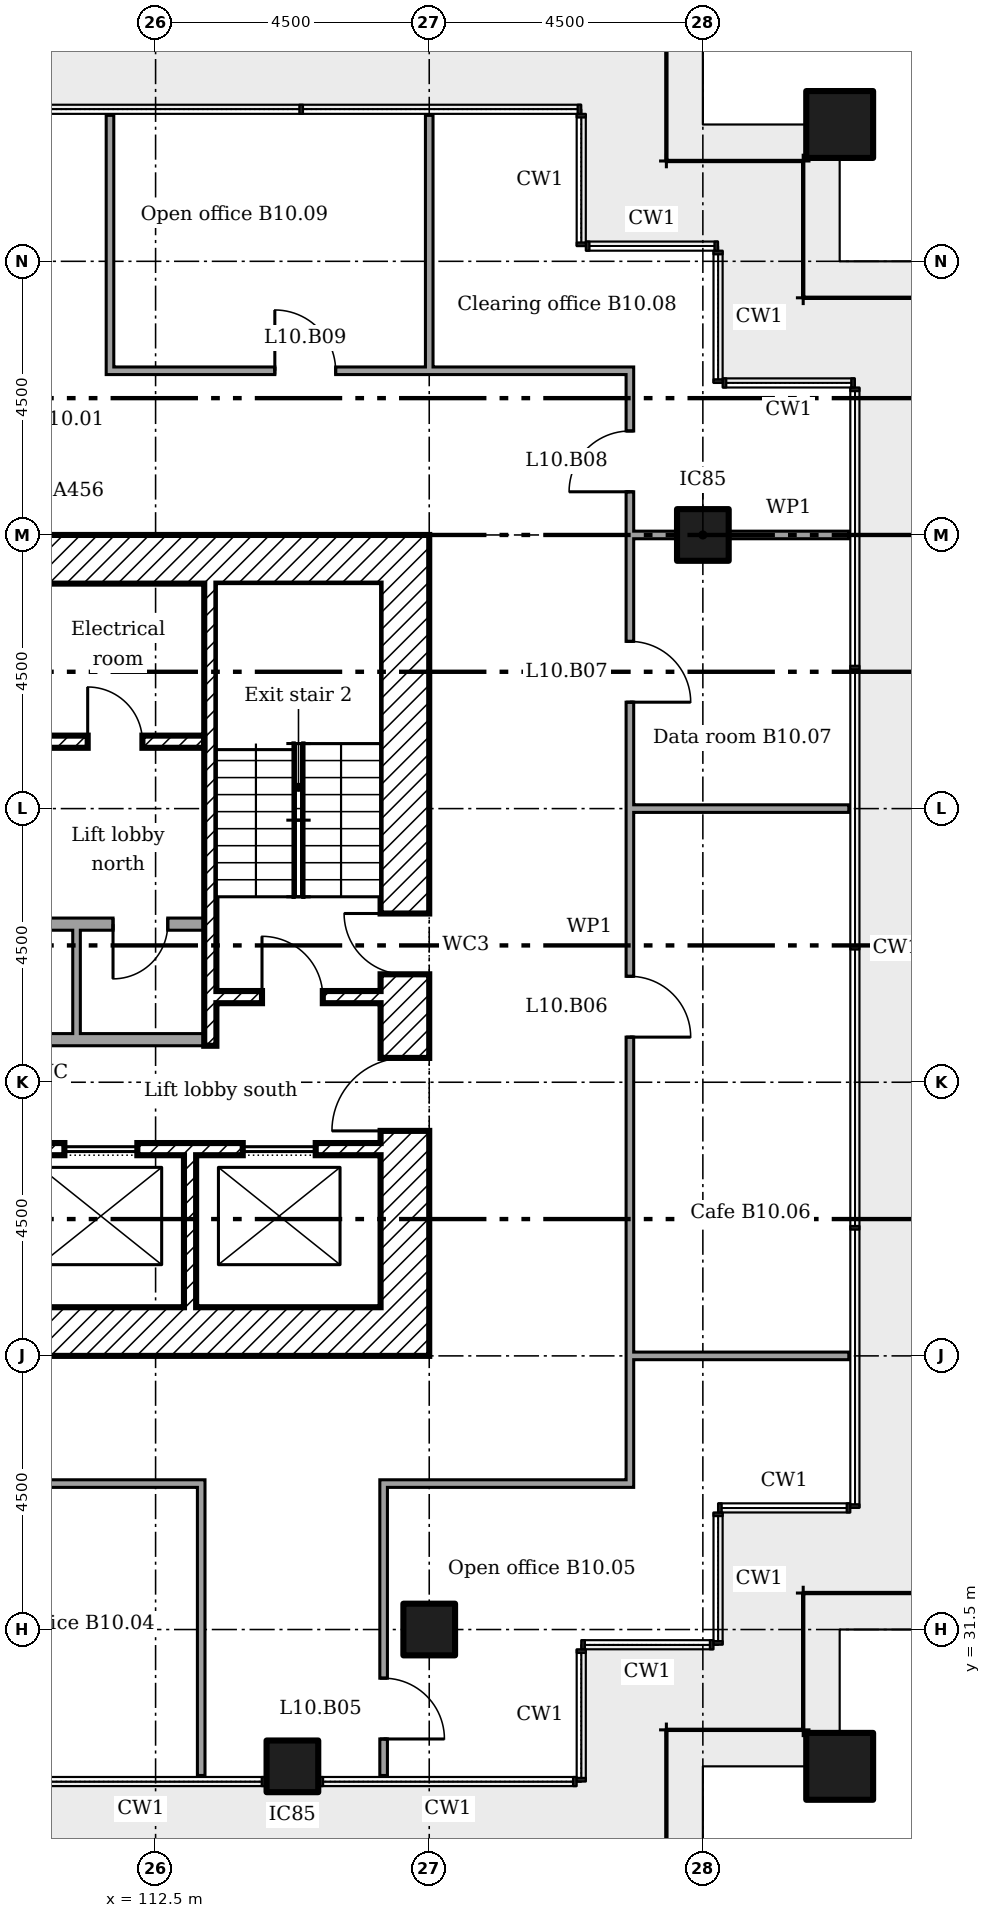
"""IFC4 building model, lengths in metres.
Left out: names, types, materials, properties, quantities, classifications, styles, units other than length and angle.
Written with IfcOpenShell. Run it as: python <this file> out.ifc"""

import sys

from ifc_helpers import new_model, si_unit, direction, frame, frame_2d, origin, origin_2d, place, context, subcontext, project, spatial, rectangle, extrude, element, fill, save


model = new_model("IFC4")
c1 = context("Model", 3, precision=1e-05, world=origin(), true_north=direction((0.0, 1.0)))
c2 = subcontext(c1, "Body", "Model", "MODEL_VIEW")
j1 = project(units=[si_unit("LENGTHUNIT", "METRE"), si_unit("PLANEANGLEUNIT", "RADIAN")], contexts=[c1])
p1 = place(None, origin())
s1 = spatial("IfcSite", under=j1, at=p1, CompositionType="ELEMENT")
p2 = place(p1, origin())
s2 = spatial("IfcBuilding", under=s1, at=p2, CompositionType="ELEMENT")
p3 = place(p2, frame((0.0, 0.0, 47.4)))
s3 = spatial("IfcBuildingStorey", under=s2, at=p3, CompositionType="ELEMENT", Elevation=47.4)
for number, where in (
    (1, (123.75, 29.25, 0.0)),
    (2, (123.75, 56.25, 0.0)),
):
    element("IfcColumn", number, at=place(p3, frame(where)), inside=s3, PredefinedType="COLUMN", context=c2, shape_type="SweptSolid", body=[
        extrude(rectangle(XDim=1.1, YDim=1.1, at=origin_2d()), origin(), (0.0, 0.0, 1.0), 3.6),
    ])
for number, where in (
    (3, (114.75, 29.25, 0.0)),
    (4, (117.0, 31.5, 0.0)),
    (5, (121.5, 49.5, 0.0)),
):
    element("IfcColumn", number, at=place(p3, frame(where)), inside=s3, PredefinedType="COLUMN", context=c2, shape_type="SweptSolid", body=[
        extrude(rectangle(XDim=0.85, YDim=0.85, at=origin_2d()), origin(), (0.0, 0.0, 1.0), 3.6),
    ])
p4 = place(p3, frame((116.6, 36.0, 0.0), z_axis=(0.0, 0.0, 1.0), x_axis=(0.0, 1.0, 0.0)))
e6 = element("IfcWall", 6, at=p4, inside=s3, PredefinedType="SHEAR", context=c2, shape_type="SweptSolid", body=[
    extrude(rectangle(XDim=13.5, YDim=0.8, at=frame_2d((6.75, 0.0))), origin(), (0.0, 0.0, 1.0), 3.35),
])
p5 = place(p4, frame((3.7, 0.0, 0.0)))
e7 = element("IfcOpeningElement", 7, at=p5, cuts=e6, PredefinedType="OPENING", context=c2, shape_type="SweptSolid", body=[
    extrude(rectangle(XDim=1.2, YDim=2.1, at=frame_2d((0.6, 1.05))), frame((0.0, 0.41, 0.0), z_axis=(0.0, -1.0, 0.0), x_axis=(1.0, 0.0, 0.0)), (0.0, 0.0, 1.0), 0.82),
])
p6 = place(p4, frame((6.275, 0.0, 0.0)))
e8 = element("IfcOpeningElement", 8, at=p6, cuts=e6, PredefinedType="OPENING", context=c2, shape_type="SweptSolid", body=[
    extrude(rectangle(XDim=1.0, YDim=2.1, at=frame_2d((0.5, 1.05))), frame((0.0, 0.41, 0.0), z_axis=(0.0, -1.0, 0.0), x_axis=(1.0, 0.0, 0.0)), (0.0, 0.0, 1.0), 0.82),
])
for number, where in (
    (9, (104.3, 49.1, 0.0)),
    (10, (104.3, 36.4, 0.0)),
):
    element("IfcWall", number, at=place(p3, frame(where)), inside=s3, PredefinedType="SHEAR", context=c2, shape_type="SweptSolid", body=[
        extrude(rectangle(XDim=11.9, YDim=0.8, at=frame_2d((5.95, 0.0))), origin(), (0.0, 0.0, 1.0), 3.35),
    ])
p7 = place(p3, frame((113.067, 36.8, 0.0), z_axis=(0.0, 0.0, 1.0), x_axis=(0.0, 1.0, 0.0)))
e11 = element("IfcWall", 11, at=p7, inside=s3, PredefinedType="SHEAR", context=c2, shape_type="SweptSolid", body=[
    extrude(rectangle(XDim=2.5, YDim=0.2, at=frame_2d((1.25, 0.0))), origin(), (0.0, 0.0, 1.0), 3.35),
])
p8 = place(p3, frame((110.467, 46.1, 0.0)))
e12 = element("IfcWall", 12, at=p8, inside=s3, PredefinedType="SHEAR", context=c2, shape_type="SweptSolid", body=[
    extrude(rectangle(XDim=2.833, YDim=0.2, at=frame_2d((1.417, 0.0))), origin(), (0.0, 0.0, 1.0), 3.35),
])
p9 = place(p8, frame((0.917, 0.0, 0.0)))
e13 = element("IfcOpeningElement", 13, at=p9, cuts=e12, PredefinedType="OPENING", context=c2, shape_type="SweptSolid", body=[
    extrude(rectangle(XDim=0.9, YDim=2.1, at=frame_2d((0.45, 1.05))), frame((0.0, 0.11, 0.0), z_axis=(0.0, -1.0, 0.0), x_axis=(1.0, 0.0, 0.0)), (0.0, 0.0, 1.0), 0.22),
])
p10 = place(p3, frame((107.2, 39.4, 0.0)))
e14 = element("IfcWall", 14, at=p10, inside=s3, PredefinedType="SHEAR", context=c2, shape_type="SweptSolid", body=[
    extrude(rectangle(XDim=9.0, YDim=0.2, at=frame_2d((4.5, 0.0))), origin(), (0.0, 0.0, 1.0), 3.35),
])
p11 = place(p10, frame((0.867, 0.0, 0.0)))
e15 = element("IfcOpeningElement", 15, at=p11, cuts=e14, PredefinedType="OPENING", context=c2, shape_type="SweptSolid", body=[
    extrude(rectangle(XDim=1.2, YDim=2.1, at=frame_2d((0.6, 1.05))), frame((0.0, 0.11, 0.0), z_axis=(0.0, -1.0, 0.0), x_axis=(1.0, 0.0, 0.0)), (0.0, 0.0, 1.0), 0.22),
])
p12 = place(p10, frame((3.8, 0.0, 0.0)))
e16 = element("IfcOpeningElement", 16, at=p12, cuts=e14, PredefinedType="OPENING", context=c2, shape_type="SweptSolid", body=[
    extrude(rectangle(XDim=1.2, YDim=2.1, at=frame_2d((0.6, 1.05))), frame((0.0, 0.11, 0.0), z_axis=(0.0, -1.0, 0.0), x_axis=(1.0, 0.0, 0.0)), (0.0, 0.0, 1.0), 0.22),
])
p13 = place(p10, frame((6.733, 0.0, 0.0)))
e17 = element("IfcOpeningElement", 17, at=p13, cuts=e14, PredefinedType="OPENING", context=c2, shape_type="SweptSolid", body=[
    extrude(rectangle(XDim=1.2, YDim=2.1, at=frame_2d((0.6, 1.05))), frame((0.0, 0.11, 0.0), z_axis=(0.0, -1.0, 0.0), x_axis=(1.0, 0.0, 0.0)), (0.0, 0.0, 1.0), 0.22),
])
p14 = place(p3, frame((113.5, 41.9, 0.0)))
e18 = element("IfcWall", 18, at=p14, inside=s3, PredefinedType="SHEAR", context=c2, shape_type="SweptSolid", body=[
    extrude(rectangle(XDim=2.7, YDim=0.2, at=frame_2d((1.35, 0.0))), origin(), (0.0, 0.0, 1.0), 3.35),
])
p15 = place(p14, frame((0.75, 0.0, 0.0)))
e19 = element("IfcOpeningElement", 19, at=p15, cuts=e18, PredefinedType="OPENING", context=c2, shape_type="SweptSolid", body=[
    extrude(rectangle(XDim=1.0, YDim=2.1, at=frame_2d((0.5, 1.05))), frame((0.0, 0.11, 0.0), z_axis=(0.0, -1.0, 0.0), x_axis=(1.0, 0.0, 0.0)), (0.0, 0.0, 1.0), 0.22),
])
p16 = place(p3, frame((113.4, 41.1, 0.0), z_axis=(0.0, 0.0, 1.0), x_axis=(0.0, 1.0, 0.0)))
e20 = element("IfcWall", 20, at=p16, inside=s3, PredefinedType="SHEAR", context=c2, shape_type="SweptSolid", body=[
    extrude(rectangle(XDim=7.6, YDim=0.2, at=frame_2d((3.8, 0.0))), origin(), (0.0, 0.0, 1.0), 3.35),
])
p17 = place(p3, frame((107.2, 43.1, 0.0)))
e21 = element("IfcWall", 21, at=p17, inside=s3, PredefinedType="PARTITIONING", context=c2, shape_type="SweptSolid", body=[
    extrude(rectangle(XDim=6.1, YDim=0.2, at=frame_2d((3.05, 0.0))), origin(), (0.0, 0.0, 1.0), 3.35),
])
p18 = place(p17, frame((4.6, 0.0, 0.0)))
e22 = element("IfcOpeningElement", 22, at=p18, cuts=e21, PredefinedType="OPENING", context=c2, shape_type="SweptSolid", body=[
    extrude(rectangle(XDim=0.9, YDim=2.1, at=frame_2d((0.45, 1.05))), frame((0.0, 0.11, 0.0), z_axis=(0.0, -1.0, 0.0), x_axis=(1.0, 0.0, 0.0)), (0.0, 0.0, 1.0), 0.22),
])
p19 = place(p3, frame((107.2, 41.2, 0.0)))
e23 = element("IfcWall", 23, at=p19, inside=s3, PredefinedType="PARTITIONING", context=c2, shape_type="SweptSolid", body=[
    extrude(rectangle(XDim=6.1, YDim=0.2, at=frame_2d((3.05, 0.0))), origin(), (0.0, 0.0, 1.0), 3.35),
])
p20 = place(p19, frame((0.55, 0.0, 0.0)))
e24 = element("IfcOpeningElement", 24, at=p20, cuts=e23, PredefinedType="OPENING", context=c2, shape_type="SweptSolid", body=[
    extrude(rectangle(XDim=0.9, YDim=2.1, at=frame_2d((0.45, 1.05))), frame((0.0, 0.11, 0.0), z_axis=(0.0, -1.0, 0.0), x_axis=(1.0, 0.0, 0.0)), (0.0, 0.0, 1.0), 0.22),
])
p21 = place(p19, frame((2.55, 0.0, 0.0)))
e25 = element("IfcOpeningElement", 25, at=p21, cuts=e23, PredefinedType="OPENING", context=c2, shape_type="SweptSolid", body=[
    extrude(rectangle(XDim=0.9, YDim=2.1, at=frame_2d((0.45, 1.05))), frame((0.0, 0.11, 0.0), z_axis=(0.0, -1.0, 0.0), x_axis=(1.0, 0.0, 0.0)), (0.0, 0.0, 1.0), 0.22),
])
p22 = place(p3, frame((111.2, 41.3, 0.0), z_axis=(0.0, 0.0, 1.0), x_axis=(0.0, 1.0, 0.0)))
e26 = element("IfcWall", 26, at=p22, inside=s3, PredefinedType="PARTITIONING", context=c2, shape_type="SweptSolid", body=[
    extrude(rectangle(XDim=1.7, YDim=0.125, at=frame_2d((0.85, 0.0))), origin(), (0.0, 0.0, 1.0), 3.35),
])
p23 = place(p3, frame((100.738, 33.9, 0.0)))
e27 = element("IfcWall", 27, at=p23, inside=s3, PredefinedType="PARTITIONING", context=c2, shape_type="SweptSolid", body=[
    extrude(rectangle(XDim=12.575, YDim=0.125, at=frame_2d((6.288, 0.0))), origin(), (0.0, 0.0, 1.0), 3.45),
])
p24 = place(p23, frame((7.137, 0.0, 0.0)))
e28 = element("IfcOpeningElement", 28, at=p24, cuts=e27, PredefinedType="OPENING", context=c2, shape_type="SweptSolid", body=[
    extrude(rectangle(XDim=1.0, YDim=2.1, at=frame_2d((0.5, 1.05))), frame((0.0, 0.073, 0.0), z_axis=(0.0, -1.0, 0.0), x_axis=(1.0, 0.0, 0.0)), (0.0, 0.0, 1.0), 0.145),
])
p25 = place(p3, frame((116.188, 33.9, 0.0)))
e29 = element("IfcWall", 29, at=p25, inside=s3, PredefinedType="PARTITIONING", context=c2, shape_type="SweptSolid", body=[
    extrude(rectangle(XDim=4.175, YDim=0.125, at=frame_2d((2.087, 0.0))), origin(), (0.0, 0.0, 1.0), 3.45),
])
for number, where in (
    (30, (120.3, 36.0, 0.0)),
    (31, (120.3, 45.0, 0.0)),
):
    element("IfcWall", number, at=place(p3, frame(where)), inside=s3, PredefinedType="PARTITIONING", context=c2, shape_type="SweptSolid", body=[
        extrude(rectangle(XDim=3.6, YDim=0.125, at=frame_2d((1.8, 0.0))), origin(), (0.0, 0.0, 1.0), 2.851),
    ])
p26 = place(p3, frame((120.3, 49.5, 0.0)))
e32 = element("IfcWall", 32, at=p26, inside=s3, PredefinedType="PARTITIONING", context=c2, shape_type="SweptSolid", body=[
    extrude(rectangle(XDim=0.775, YDim=0.125, at=frame_2d((0.387, 0.0))), origin(), (0.0, 0.0, 1.0), 2.842),
])
p27 = place(p3, frame((121.925, 49.5, 0.0)))
e33 = element("IfcWall", 33, at=p27, inside=s3, PredefinedType="PARTITIONING", context=c2, shape_type="SweptSolid", body=[
    extrude(rectangle(XDim=1.975, YDim=0.125, at=frame_2d((0.987, 0.0))), origin(), (0.0, 0.0, 1.0), 2.842),
])
p28 = place(p3, frame((111.688, 52.2, 0.0)))
e34 = element("IfcWall", 34, at=p28, inside=s3, PredefinedType="PARTITIONING", context=c2, shape_type="SweptSolid", body=[
    extrude(rectangle(XDim=8.675, YDim=0.125, at=frame_2d((4.337, 0.0))), origin(), (0.0, 0.0, 1.0), 3.45),
])
p29 = place(p28, frame((2.773, 0.0, 0.0)))
e35 = element("IfcOpeningElement", 35, at=p29, cuts=e34, PredefinedType="OPENING", context=c2, shape_type="SweptSolid", body=[
    extrude(rectangle(XDim=1.0, YDim=2.1, at=frame_2d((0.5, 1.05))), frame((0.0, 0.073, 0.0), z_axis=(0.0, -1.0, 0.0), x_axis=(1.0, 0.0, 0.0)), (0.0, 0.0, 1.0), 0.145),
])
p30 = place(p3, frame((111.75, 52.262, 0.0), z_axis=(0.0, 0.0, 1.0), x_axis=(0.0, 1.0, 0.0)))
e36 = element("IfcWall", 36, at=p30, inside=s3, PredefinedType="PARTITIONING", context=c2, shape_type="SweptSolid", body=[
    extrude(rectangle(XDim=4.137, YDim=0.125, at=frame_2d((2.069, 0.0))), origin(), (0.0, 0.0, 1.0), 3.45),
])
p31 = place(p3, frame((113.25, 29.1, 0.0), z_axis=(0.0, 0.0, 1.0), x_axis=(0.0, 1.0, 0.0)))
e37 = element("IfcWall", 37, at=p31, inside=s3, PredefinedType="PARTITIONING", context=c2, shape_type="SweptSolid", body=[
    extrude(rectangle(XDim=4.737, YDim=0.125, at=frame_2d((2.369, 0.0))), origin(), (0.0, 0.0, 1.0), 3.45),
])
p32 = place(p3, frame((116.25, 29.1, 0.0), z_axis=(0.0, 0.0, 1.0), x_axis=(0.0, 1.0, 0.0)))
e38 = element("IfcWall", 38, at=p32, inside=s3, PredefinedType="PARTITIONING", context=c2, shape_type="SweptSolid", body=[
    extrude(rectangle(XDim=4.737, YDim=0.125, at=frame_2d((2.369, 0.0))), origin(), (0.0, 0.0, 1.0), 3.45),
])
p33 = place(p32, frame((0.6, 0.0, 0.0)))
e39 = element("IfcOpeningElement", 39, at=p33, cuts=e38, PredefinedType="OPENING", context=c2, shape_type="SweptSolid", body=[
    extrude(rectangle(XDim=1.0, YDim=2.1, at=frame_2d((0.5, 1.05))), frame((0.0, 0.073, 0.0), z_axis=(0.0, -1.0, 0.0), x_axis=(1.0, 0.0, 0.0)), (0.0, 0.0, 1.0), 0.145),
])
p34 = place(p3, frame((117.0, 52.2, 0.0), z_axis=(0.0, 0.0, 1.0), x_axis=(0.0, 1.0, 0.0)))
e40 = element("IfcWall", 40, at=p34, inside=s3, PredefinedType="PARTITIONING", context=c2, shape_type="SweptSolid", body=[
    extrude(rectangle(XDim=4.2, YDim=0.125, at=frame_2d((2.1, 0.0))), origin(), (0.0, 0.0, 1.0), 2.851),
])
p35 = place(p3, frame((120.3, 33.962, 0.0), z_axis=(0.0, 0.0, 1.0), x_axis=(0.0, 1.0, 0.0)))
e41 = element("IfcWall", 41, at=p35, inside=s3, PredefinedType="PARTITIONING", context=c2, shape_type="SweptSolid", body=[
    extrude(rectangle(XDim=18.175, YDim=0.125, at=frame_2d((9.087, 0.0))), origin(), (0.0, 0.0, 1.0), 3.45),
])
p36 = place(p35, frame((7.28, 0.0, 0.0)))
e42 = element("IfcOpeningElement", 42, at=p36, cuts=e41, PredefinedType="OPENING", context=c2, shape_type="SweptSolid", body=[
    extrude(rectangle(XDim=1.0, YDim=2.1, at=frame_2d((0.5, 1.05))), frame((0.0, 0.073, 0.0), z_axis=(0.0, -1.0, 0.0), x_axis=(1.0, 0.0, 0.0)), (0.0, 0.0, 1.0), 0.145),
])
p37 = place(p35, frame((12.788, 0.0, 0.0)))
e43 = element("IfcOpeningElement", 43, at=p37, cuts=e41, PredefinedType="OPENING", context=c2, shape_type="SweptSolid", body=[
    extrude(rectangle(XDim=1.0, YDim=2.1, at=frame_2d((0.5, 1.05))), frame((0.0, 0.073, 0.0), z_axis=(0.0, -1.0, 0.0), x_axis=(1.0, 0.0, 0.0)), (0.0, 0.0, 1.0), 0.145),
])
p38 = place(p35, frame((16.248, 0.0, 0.0)))
e44 = element("IfcOpeningElement", 44, at=p38, cuts=e41, PredefinedType="OPENING", context=c2, shape_type="SweptSolid", body=[
    extrude(rectangle(XDim=1.0, YDim=2.1, at=frame_2d((0.5, 1.05))), frame((0.0, 0.073, 0.0), z_axis=(0.0, -1.0, 0.0), x_axis=(1.0, 0.0, 0.0)), (0.0, 0.0, 1.0), 0.145),
])
p39 = place(p5, origin())
e45 = element("IfcDoor", 45, at=p39, inside=s3, OperationType="SINGLE_SWING_RIGHT", PredefinedType="DOOR", context=c2, shape_type="SweptSolid", body=[
    extrude(rectangle(XDim=1.2, YDim=2.1, at=frame_2d((0.6, 1.05))), frame((0.0, 0.025, 0.0), z_axis=(0.0, -1.0, 0.0), x_axis=(1.0, 0.0, 0.0)), (0.0, 0.0, 1.0), 0.05),
])
fill(e7, e45)
p40 = place(p15, origin())
e46 = element("IfcDoor", 46, at=p40, inside=s3, OperationType="SINGLE_SWING_RIGHT", PredefinedType="DOOR", context=c2, shape_type="SweptSolid", body=[
    extrude(rectangle(XDim=1.0, YDim=2.1, at=frame_2d((0.5, 1.05))), frame((0.0, 0.025, 0.0), z_axis=(0.0, -1.0, 0.0), x_axis=(1.0, 0.0, 0.0)), (0.0, 0.0, 1.0), 0.05),
])
fill(e19, e46)
p41 = place(p6, origin())
e47 = element("IfcDoor", 47, at=p41, inside=s3, OperationType="SINGLE_SWING_LEFT", PredefinedType="DOOR", context=c2, shape_type="SweptSolid", body=[
    extrude(rectangle(XDim=1.0, YDim=2.1, at=frame_2d((0.5, 1.05))), frame((0.0, 0.025, 0.0), z_axis=(0.0, -1.0, 0.0), x_axis=(1.0, 0.0, 0.0)), (0.0, 0.0, 1.0), 0.05),
])
fill(e8, e47)
p42 = place(p9, origin())
e48 = element("IfcDoor", 48, at=p42, inside=s3, OperationType="SINGLE_SWING_RIGHT", PredefinedType="DOOR", context=c2, shape_type="SweptSolid", body=[
    extrude(rectangle(XDim=0.9, YDim=2.1, at=frame_2d((0.45, 1.05))), frame((0.0, 0.025, 0.0), z_axis=(0.0, -1.0, 0.0), x_axis=(1.0, 0.0, 0.0)), (0.0, 0.0, 1.0), 0.05),
])
fill(e13, e48)
p43 = place(p18, frame((0.9, 0.0, 0.0), x_axis=(-1.0, 0.0, 0.0)))
e49 = element("IfcDoor", 49, at=p43, inside=s3, OperationType="SINGLE_SWING_LEFT", PredefinedType="DOOR", context=c2, shape_type="SweptSolid", body=[
    extrude(rectangle(XDim=0.9, YDim=2.1, at=frame_2d((0.45, 1.05))), frame((0.0, 0.025, 0.0), z_axis=(0.0, -1.0, 0.0), x_axis=(1.0, 0.0, 0.0)), (0.0, 0.0, 1.0), 0.05),
])
fill(e22, e49)
p44 = place(p12, origin())
e50 = element("IfcDoor", 50, at=p44, inside=s3, OperationType="SLIDING_TO_LEFT", PredefinedType="DOOR", context=c2, shape_type="SweptSolid", body=[
    extrude(rectangle(XDim=1.2, YDim=2.1, at=frame_2d((0.6, 1.05))), frame((0.0, 0.025, 0.0), z_axis=(0.0, -1.0, 0.0), x_axis=(1.0, 0.0, 0.0)), (0.0, 0.0, 1.0), 0.05),
])
fill(e16, e50)
p45 = place(p13, origin())
e51 = element("IfcDoor", 51, at=p45, inside=s3, OperationType="SLIDING_TO_LEFT", PredefinedType="DOOR", context=c2, shape_type="SweptSolid", body=[
    extrude(rectangle(XDim=1.2, YDim=2.1, at=frame_2d((0.6, 1.05))), frame((0.0, 0.025, 0.0), z_axis=(0.0, -1.0, 0.0), x_axis=(1.0, 0.0, 0.0)), (0.0, 0.0, 1.0), 0.05),
])
fill(e17, e51)
p46 = place(p33, frame((1.0, 0.0, 0.0), x_axis=(-1.0, 0.0, 0.0)))
e52 = element("IfcDoor", 52, at=p46, inside=s3, OperationType="SINGLE_SWING_LEFT", PredefinedType="DOOR", context=c2, shape_type="SweptSolid", body=[
    extrude(rectangle(XDim=1.0, YDim=2.1, at=frame_2d((0.5, 1.05))), frame((0.0, 0.025, 0.0), z_axis=(0.0, -1.0, 0.0), x_axis=(1.0, 0.0, 0.0)), (0.0, 0.0, 1.0), 0.05),
])
fill(e39, e52)
p47 = place(p36, frame((1.0, 0.0, 0.0), x_axis=(-1.0, 0.0, 0.0)))
e53 = element("IfcDoor", 53, at=p47, inside=s3, OperationType="SINGLE_SWING_LEFT", PredefinedType="DOOR", context=c2, shape_type="SweptSolid", body=[
    extrude(rectangle(XDim=1.0, YDim=2.1, at=frame_2d((0.5, 1.05))), frame((0.0, 0.025, 0.0), z_axis=(0.0, -1.0, 0.0), x_axis=(1.0, 0.0, 0.0)), (0.0, 0.0, 1.0), 0.05),
])
fill(e42, e53)
p48 = place(p37, frame((1.0, 0.0, 0.0), x_axis=(-1.0, 0.0, 0.0)))
e54 = element("IfcDoor", 54, at=p48, inside=s3, OperationType="SINGLE_SWING_LEFT", PredefinedType="DOOR", context=c2, shape_type="SweptSolid", body=[
    extrude(rectangle(XDim=1.0, YDim=2.1, at=frame_2d((0.5, 1.05))), frame((0.0, 0.025, 0.0), z_axis=(0.0, -1.0, 0.0), x_axis=(1.0, 0.0, 0.0)), (0.0, 0.0, 1.0), 0.05),
])
fill(e43, e54)
p49 = place(p38, origin())
e55 = element("IfcDoor", 55, at=p49, inside=s3, OperationType="SINGLE_SWING_RIGHT", PredefinedType="DOOR", context=c2, shape_type="SweptSolid", body=[
    extrude(rectangle(XDim=1.0, YDim=2.1, at=frame_2d((0.5, 1.05))), frame((0.0, 0.025, 0.0), z_axis=(0.0, -1.0, 0.0), x_axis=(1.0, 0.0, 0.0)), (0.0, 0.0, 1.0), 0.05),
])
fill(e44, e55)
p50 = place(p29, origin())
e56 = element("IfcDoor", 56, at=p50, inside=s3, OperationType="SINGLE_SWING_RIGHT", PredefinedType="DOOR", context=c2, shape_type="SweptSolid", body=[
    extrude(rectangle(XDim=1.0, YDim=2.1, at=frame_2d((0.5, 1.05))), frame((0.0, 0.025, 0.0), z_axis=(0.0, -1.0, 0.0), x_axis=(1.0, 0.0, 0.0)), (0.0, 0.0, 1.0), 0.05),
])
fill(e35, e56)
save(model, sys.argv[1])
